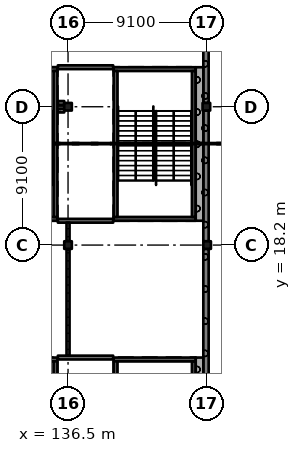
"""IFC4 building model, lengths in metres.
Left out: names, types, materials, properties, quantities, classifications, styles, units other than length and angle.
Written with IfcOpenShell. Run it as: python <this file> out.ifc"""

import sys

from ifc_helpers import new_model, si_unit, direction, frame, frame_2d, origin, origin_2d, place, context, subcontext, project, spatial, rectangle, extrude, element, fill, save


model = new_model("IFC4")
c1 = context("Model", 3, precision=1e-05, world=origin(), true_north=direction((0.0, 1.0)))
c2 = subcontext(c1, "Body", "Model", "MODEL_VIEW")
j1 = project(units=[si_unit("LENGTHUNIT", "METRE"), si_unit("PLANEANGLEUNIT", "RADIAN")], contexts=[c1])
p1 = place(None, origin())
s1 = spatial("IfcSite", under=j1, at=p1, CompositionType="ELEMENT")
p2 = place(p1, origin())
s2 = spatial("IfcBuilding", under=s1, at=p2, CompositionType="ELEMENT")
p3 = place(p2, frame((0.0, 0.0, 24.57)))
s3 = spatial("IfcBuildingStorey", under=s2, at=p3, CompositionType="ELEMENT", Elevation=24.57)
for number, where, z_axis, x_axis in (
    (1, (136.5, 18.2, 0.0), (0.0, 0.0, 1.0), (1.0, 0.0, 0.0)),
    (2, (136.5, 27.3, 0.0), (0.0, 0.0, 1.0), (1.0, 0.0, 0.0)),
    (3, (145.65, 18.2, 0.0), (0.0, 0.0, 1.0), (1.0, 0.0, 0.0)),
    (4, (145.6, 27.3, 0.0), (0.0, 0.0, 1.0), (1.0, 0.0, 0.0)),
):
    element("IfcColumn", number, at=place(p3, frame(where, z_axis=z_axis, x_axis=x_axis)), inside=s3, PredefinedType="COLUMN", context=c2, shape_type="SweptSolid", body=[
        extrude(rectangle(XDim=0.5, YDim=0.5, at=origin_2d()), origin(), (0.0, 0.0, 1.0), 4.55),
    ])
p4 = place(p3, frame((144.9, 10.675, 0.0), z_axis=(0.0, 0.0, 1.0), x_axis=(-1.0, 0.0, 0.0)))
e5 = element("IfcWall", 5, at=p4, inside=s3, PredefinedType="SHEAR", context=c2, shape_type="SweptSolid", body=[
    extrude(rectangle(XDim=5.4, YDim=0.25, at=frame_2d((2.7, 0.0))), origin(), (0.0, 0.0, 1.0), 4.55),
])
p5 = place(p4, frame((1.5, 0.0, 0.0)))
e6 = element("IfcOpeningElement", 6, at=p5, cuts=e5, PredefinedType="OPENING", context=c2, shape_type="SweptSolid", body=[
    extrude(rectangle(XDim=2.4, YDim=2.1, at=frame_2d((1.2, 1.05))), frame((0.0, 0.135, 0.0), z_axis=(0.0, -1.0, 0.0), x_axis=(1.0, 0.0, 0.0)), (0.0, 0.0, 1.0), 0.27),
])
for number, where, z_axis, x_axis in (
    (7, (139.625, 10.55, 0.0), (0.0, 0.0, 1.0), (0.0, -1.0, 0.0)),
    (8, (144.775, 10.55, 0.0), (0.0, 0.0, 1.0), (0.0, -1.0, 0.0)),
):
    element("IfcWall", number, at=place(p3, frame(where, z_axis=z_axis, x_axis=x_axis)), inside=s3, PredefinedType="SHEAR", context=c2, shape_type="SweptSolid", body=[
        extrude(rectangle(XDim=9.6, YDim=0.25, at=frame_2d((4.8, 0.0))), origin(), (0.0, 0.0, 1.0), 4.55),
    ])
p6 = place(p3, frame((135.8, 10.675, 0.0), z_axis=(0.0, 0.0, 1.0), x_axis=(-1.0, 0.0, 0.0)))
e9 = element("IfcWall", 9, at=p6, inside=s3, PredefinedType="SHEAR", context=c2, shape_type="SweptSolid", body=[
    extrude(rectangle(XDim=5.4, YDim=0.25, at=frame_2d((2.7, 0.0))), origin(), (0.0, 0.0, 1.0), 4.55),
])
p7 = place(p6, frame((1.5, 0.0, 0.0)))
e10 = element("IfcOpeningElement", 10, at=p7, cuts=e9, PredefinedType="OPENING", context=c2, shape_type="SweptSolid", body=[
    extrude(rectangle(XDim=2.4, YDim=2.1, at=frame_2d((1.2, 1.05))), frame((0.0, 0.135, 0.0), z_axis=(0.0, -1.0, 0.0), x_axis=(1.0, 0.0, 0.0)), (0.0, 0.0, 1.0), 0.27),
])
p8 = place(p3, frame((135.675, 10.55, 0.0), z_axis=(0.0, 0.0, 1.0), x_axis=(0.0, -1.0, 0.0)))
e11 = element("IfcWall", 11, at=p8, inside=s3, PredefinedType="SHEAR", context=c2, shape_type="SweptSolid", body=[
    extrude(rectangle(XDim=9.6, YDim=0.25, at=frame_2d((4.8, 0.0))), origin(), (0.0, 0.0, 1.0), 4.55),
])
p9 = place(p3, frame((144.9, 19.925, 0.0), z_axis=(0.0, 0.0, 1.0), x_axis=(-1.0, 0.0, 0.0)))
e12 = element("IfcWall", 12, at=p9, inside=s3, PredefinedType="SHEAR", context=c2, shape_type="SweptSolid", body=[
    extrude(rectangle(XDim=5.4, YDim=0.25, at=frame_2d((2.7, 0.0))), origin(), (0.0, 0.0, 1.0), 4.55),
])
p10 = place(p9, frame((1.5, 0.0, 0.0)))
e13 = element("IfcOpeningElement", 13, at=p10, cuts=e12, PredefinedType="OPENING", context=c2, shape_type="SweptSolid", body=[
    extrude(rectangle(XDim=2.4, YDim=2.1, at=frame_2d((1.2, 1.05))), frame((0.0, 0.135, 0.0), z_axis=(0.0, -1.0, 0.0), x_axis=(1.0, 0.0, 0.0)), (0.0, 0.0, 1.0), 0.27),
])
p11 = place(p3, frame((144.9, 29.775, 0.0), z_axis=(0.0, 0.0, 1.0), x_axis=(-1.0, 0.0, 0.0)))
e14 = element("IfcWall", 14, at=p11, inside=s3, PredefinedType="SHEAR", context=c2, shape_type="SweptSolid", body=[
    extrude(rectangle(XDim=5.4, YDim=0.25, at=frame_2d((2.7, 0.0))), origin(), (0.0, 0.0, 1.0), 4.55),
])
for number, where, z_axis, x_axis in (
    (15, (139.625, 29.65, 0.0), (0.0, 0.0, 1.0), (0.0, -1.0, 0.0)),
    (16, (144.775, 29.65, 0.0), (0.0, 0.0, 1.0), (0.0, -1.0, 0.0)),
):
    element("IfcWall", number, at=place(p3, frame(where, z_axis=z_axis, x_axis=x_axis)), inside=s3, PredefinedType="SHEAR", context=c2, shape_type="SweptSolid", body=[
        extrude(rectangle(XDim=9.6, YDim=0.25, at=frame_2d((4.8, 0.0))), origin(), (0.0, 0.0, 1.0), 4.55),
    ])
p12 = place(p3, frame((135.8, 19.925, 0.0), z_axis=(0.0, 0.0, 1.0), x_axis=(-1.0, 0.0, 0.0)))
e17 = element("IfcWall", 17, at=p12, inside=s3, PredefinedType="SHEAR", context=c2, shape_type="SweptSolid", body=[
    extrude(rectangle(XDim=5.4, YDim=0.25, at=frame_2d((2.7, 0.0))), origin(), (0.0, 0.0, 1.0), 4.55),
])
p13 = place(p12, frame((1.5, 0.0, 0.0)))
e18 = element("IfcOpeningElement", 18, at=p13, cuts=e17, PredefinedType="OPENING", context=c2, shape_type="SweptSolid", body=[
    extrude(rectangle(XDim=2.4, YDim=2.1, at=frame_2d((1.2, 1.05))), frame((0.0, 0.135, 0.0), z_axis=(0.0, -1.0, 0.0), x_axis=(1.0, 0.0, 0.0)), (0.0, 0.0, 1.0), 0.27),
])
p14 = place(p3, frame((135.8, 29.775, 0.0), z_axis=(0.0, 0.0, 1.0), x_axis=(-1.0, 0.0, 0.0)))
e19 = element("IfcWall", 19, at=p14, inside=s3, PredefinedType="SHEAR", context=c2, shape_type="SweptSolid", body=[
    extrude(rectangle(XDim=5.4, YDim=0.25, at=frame_2d((2.7, 0.0))), origin(), (0.0, 0.0, 1.0), 4.55),
])
p15 = place(p3, frame((135.675, 29.65, 0.0), z_axis=(0.0, 0.0, 1.0), x_axis=(0.0, -1.0, 0.0)))
e20 = element("IfcWall", 20, at=p15, inside=s3, PredefinedType="SHEAR", context=c2, shape_type="SweptSolid", body=[
    extrude(rectangle(XDim=9.6, YDim=0.25, at=frame_2d((4.8, 0.0))), origin(), (0.0, 0.0, 1.0), 4.55),
])
p16 = place(p3, frame((145.575, 9.35, 0.0), z_axis=(0.0, 0.0, 1.0), x_axis=(0.0, 1.0, 0.0)))
e21 = element("IfcWall", 21, at=p16, inside=s3, PredefinedType="SOLIDWALL", context=c2, shape_type="SweptSolid", body=[
    extrude(rectangle(XDim=8.6, YDim=0.35, at=frame_2d((4.3, 0.0))), origin(), (0.0, 0.0, 1.0), 3.6),
])
p17 = place(p3, frame((145.575, 18.45, 0.0), z_axis=(0.0, 0.0, 1.0), x_axis=(0.0, 1.0, 0.0)))
e22 = element("IfcWall", 22, at=p17, inside=s3, PredefinedType="SOLIDWALL", context=c2, shape_type="SweptSolid", body=[
    extrude(rectangle(XDim=8.6, YDim=0.35, at=frame_2d((4.3, 0.0))), origin(), (0.0, 0.0, 1.0), 3.6),
])
p18 = place(p3, frame((145.575, 27.55, 0.0), z_axis=(0.0, 0.0, 1.0), x_axis=(0.0, 1.0, 0.0)))
e23 = element("IfcWall", 23, at=p18, inside=s3, PredefinedType="SOLIDWALL", context=c2, shape_type="SweptSolid", body=[
    extrude(rectangle(XDim=8.6, YDim=0.35, at=frame_2d((4.3, 0.0))), origin(), (0.0, 0.0, 1.0), 3.6),
])
p19 = place(p3, frame((145.15, 0.7, 0.0), z_axis=(0.0, 0.0, 1.0), x_axis=(0.0, 1.0, 0.0)))
e24 = element("IfcWall", 24, at=p19, inside=s3, PredefinedType="SOLIDWALL", context=c2, shape_type="SweptSolid", body=[
    extrude(rectangle(XDim=10.1, YDim=0.5, at=frame_2d((5.05, 0.0))), origin(), (0.0, 0.0, 1.0), 4.55),
])
p20 = place(p3, frame((145.15, 19.8, 0.0), z_axis=(0.0, 0.0, 1.0), x_axis=(0.0, 1.0, 0.0)))
e25 = element("IfcWall", 25, at=p20, inside=s3, PredefinedType="SOLIDWALL", context=c2, shape_type="SweptSolid", body=[
    extrude(rectangle(XDim=10.1, YDim=0.5, at=frame_2d((5.05, 0.0))), origin(), (0.0, 0.0, 1.0), 4.55),
])
p21 = place(p3, frame((135.83, 19.8, 0.0), z_axis=(0.0, 0.0, 1.0), x_axis=(1.0, 0.0, 0.0)))
e26 = element("IfcWall", 26, at=p21, inside=s3, PredefinedType="SOLIDWALL", context=c2, shape_type="SweptSolid", body=[
    extrude(rectangle(XDim=3.64, YDim=0.25, at=frame_2d((1.82, 0.0))), origin(), (0.0, 0.0, 1.0), 4.35),
])
p22 = place(p21, frame((1.62, 0.0, 0.0)))
e27 = element("IfcOpeningElement", 27, at=p22, cuts=e26, PredefinedType="OPENING", context=c2, shape_type="SweptSolid", body=[
    extrude(rectangle(XDim=1.0, YDim=2.1, at=frame_2d((0.5, 1.05))), frame((0.0, 0.135, 0.0), z_axis=(0.0, -1.0, 0.0), x_axis=(1.0, 0.0, 0.0)), (0.0, 0.0, 1.0), 0.27),
])
p23 = place(p3, frame((135.83, 27.05, 0.0), z_axis=(0.0, 0.0, 1.0), x_axis=(1.0, 0.0, 0.0)))
e28 = element("IfcWall", 28, at=p23, inside=s3, PredefinedType="SOLIDWALL", context=c2, shape_type="SweptSolid", body=[
    extrude(rectangle(XDim=0.42, YDim=0.25, at=frame_2d((0.21, 0.0))), origin(), (0.0, 0.0, 1.0), 4.35),
])
p24 = place(p3, frame((135.83, 29.9, 0.0), z_axis=(0.0, 0.0, 1.0), x_axis=(1.0, 0.0, 0.0)))
e29 = element("IfcWall", 29, at=p24, inside=s3, PredefinedType="SOLIDWALL", context=c2, shape_type="SweptSolid", body=[
    extrude(rectangle(XDim=3.64, YDim=0.25, at=frame_2d((1.82, 0.0))), origin(), (0.0, 0.0, 1.0), 4.35),
])
p25 = place(p3, frame((136.25, 27.55, 0.0), z_axis=(0.0, 0.0, 1.0), x_axis=(-1.0, 0.0, 0.0)))
e30 = element("IfcWall", 30, at=p25, inside=s3, PredefinedType="SOLIDWALL", context=c2, shape_type="SweptSolid", body=[
    extrude(rectangle(XDim=0.42, YDim=0.25, at=frame_2d((0.21, 0.0))), origin(), (0.0, 0.0, 1.0), 4.35),
])
p26 = place(p3, frame((135.83, 10.8, 0.0), z_axis=(0.0, 0.0, 1.0), x_axis=(1.0, 0.0, 0.0)))
e31 = element("IfcWall", 31, at=p26, inside=s3, PredefinedType="SOLIDWALL", context=c2, shape_type="SweptSolid", body=[
    extrude(rectangle(XDim=3.64, YDim=0.25, at=frame_2d((1.82, 0.0))), origin(), (0.0, 0.0, 1.0), 4.35),
])
p27 = place(p26, frame((1.69, 0.0, 0.0)))
e32 = element("IfcOpeningElement", 32, at=p27, cuts=e31, PredefinedType="OPENING", context=c2, shape_type="SweptSolid", body=[
    extrude(rectangle(XDim=1.0, YDim=2.1, at=frame_2d((0.5, 1.05))), frame((0.0, 0.135, 0.0), z_axis=(0.0, -1.0, 0.0), x_axis=(1.0, 0.0, 0.0)), (0.0, 0.0, 1.0), 0.27),
])
p28 = place(p3, frame((136.5, 10.925, 0.0), z_axis=(0.0, 0.0, 1.0), x_axis=(0.0, 1.0, 0.0)))
e33 = element("IfcWall", 33, at=p28, inside=s3, PredefinedType="PARTITIONING", context=c2, shape_type="SweptSolid", body=[
    extrude(rectangle(XDim=7.025, YDim=0.2, at=frame_2d((3.512, 0.0))), origin(), (0.0, 0.0, 1.0), 3.6),
])
p29 = place(p28, frame((0.85, 0.0, 0.0)))
e34 = element("IfcOpeningElement", 34, at=p29, cuts=e33, PredefinedType="OPENING", context=c2, shape_type="SweptSolid", body=[
    extrude(rectangle(XDim=1.8, YDim=2.4, at=frame_2d((0.9, 1.2))), frame((0.0, 0.11, 0.0), z_axis=(0.0, -1.0, 0.0), x_axis=(1.0, 0.0, 0.0)), (0.0, 0.0, 1.0), 0.22),
])
p30 = place(p28, frame((4.35, 0.0, 0.0)))
e35 = element("IfcOpeningElement", 35, at=p30, cuts=e33, PredefinedType="OPENING", context=c2, shape_type="SweptSolid", body=[
    extrude(rectangle(XDim=1.8, YDim=2.4, at=frame_2d((0.9, 1.2))), frame((0.0, 0.11, 0.0), z_axis=(0.0, -1.0, 0.0), x_axis=(1.0, 0.0, 0.0)), (0.0, 0.0, 1.0), 0.22),
])
p31 = place(p3, frame((136.5, 18.45, 0.0), z_axis=(0.0, 0.0, 1.0), x_axis=(0.0, 1.0, 0.0)))
e36 = element("IfcWall", 36, at=p31, inside=s3, PredefinedType="PARTITIONING", context=c2, shape_type="SweptSolid", body=[
    extrude(rectangle(XDim=1.225, YDim=0.2, at=frame_2d((0.613, 0.0))), origin(), (0.0, 0.0, 1.0), 3.6),
])
p32 = place(p22, origin())
e37 = element("IfcDoor", 37, at=p32, inside=s3, OperationType="SINGLE_SWING_RIGHT", PredefinedType="DOOR", context=c2, shape_type="SweptSolid", body=[
    extrude(rectangle(XDim=1.0, YDim=2.1, at=frame_2d((0.5, 1.05))), frame((0.0, 0.025, 0.0), z_axis=(0.0, -1.0, 0.0), x_axis=(1.0, 0.0, 0.0)), (0.0, 0.0, 1.0), 0.05),
])
fill(e27, e37)
p33 = place(p27, origin())
e38 = element("IfcDoor", 38, at=p33, inside=s3, OperationType="SINGLE_SWING_RIGHT", PredefinedType="DOOR", context=c2, shape_type="SweptSolid", body=[
    extrude(rectangle(XDim=1.0, YDim=2.1, at=frame_2d((0.5, 1.05))), frame((0.0, 0.025, 0.0), z_axis=(0.0, -1.0, 0.0), x_axis=(1.0, 0.0, 0.0)), (0.0, 0.0, 1.0), 0.05),
])
fill(e32, e38)
p34 = place(p29, origin())
e39 = element("IfcDoor", 39, at=p34, inside=s3, OperationType="DOUBLE_DOOR_SINGLE_SWING", PredefinedType="DOOR", context=c2, shape_type="SweptSolid", body=[
    extrude(rectangle(XDim=1.8, YDim=2.4, at=frame_2d((0.9, 1.2))), frame((0.0, 0.025, 0.0), z_axis=(0.0, -1.0, 0.0), x_axis=(1.0, 0.0, 0.0)), (0.0, 0.0, 1.0), 0.05),
])
fill(e34, e39)
p35 = place(p30, origin())
e40 = element("IfcDoor", 40, at=p35, inside=s3, OperationType="DOUBLE_DOOR_SINGLE_SWING", PredefinedType="DOOR", context=c2, shape_type="SweptSolid", body=[
    extrude(rectangle(XDim=1.8, YDim=2.4, at=frame_2d((0.9, 1.2))), frame((0.0, 0.025, 0.0), z_axis=(0.0, -1.0, 0.0), x_axis=(1.0, 0.0, 0.0)), (0.0, 0.0, 1.0), 0.05),
])
fill(e35, e40)
p36 = place(p5, origin())
e41 = element("IfcDoor", 41, at=p36, inside=s3, OperationType="DOUBLE_DOOR_SINGLE_SWING", PredefinedType="DOOR", context=c2, shape_type="SweptSolid", body=[
    extrude(rectangle(XDim=2.4, YDim=2.1, at=frame_2d((1.2, 1.05))), frame((0.0, 0.025, 0.0), z_axis=(0.0, -1.0, 0.0), x_axis=(1.0, 0.0, 0.0)), (0.0, 0.0, 1.0), 0.05),
])
fill(e6, e41)
p37 = place(p10, origin())
e42 = element("IfcDoor", 42, at=p37, inside=s3, OperationType="DOUBLE_DOOR_SINGLE_SWING", PredefinedType="DOOR", context=c2, shape_type="SweptSolid", body=[
    extrude(rectangle(XDim=2.4, YDim=2.1, at=frame_2d((1.2, 1.05))), frame((0.0, 0.025, 0.0), z_axis=(0.0, -1.0, 0.0), x_axis=(1.0, 0.0, 0.0)), (0.0, 0.0, 1.0), 0.05),
])
fill(e13, e42)
save(model, sys.argv[1])
